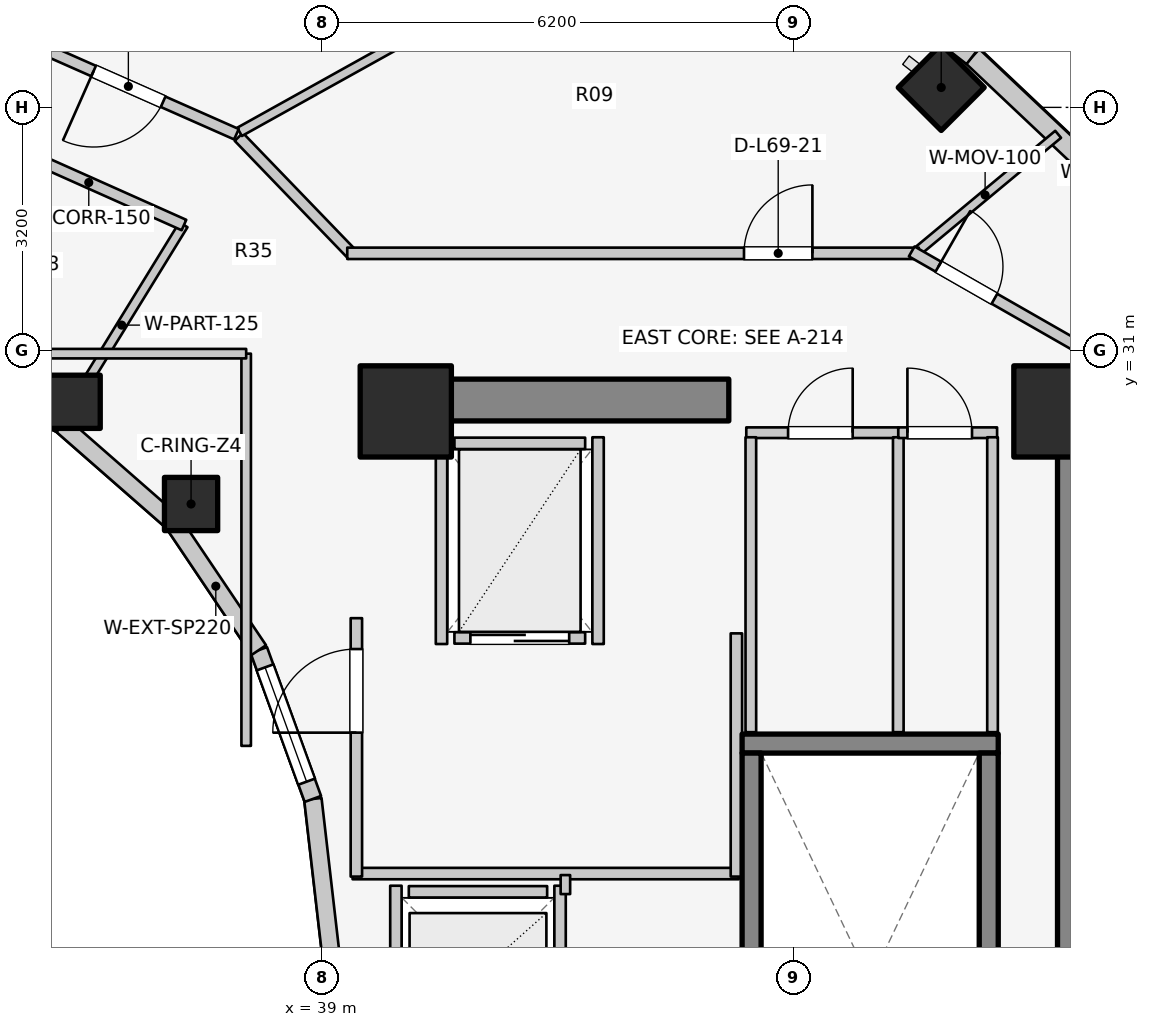
"""IFC4 building model, lengths in metres.
Left out: names, types, materials, properties, quantities, classifications, styles, units other than length and angle.
Written with IfcOpenShell. Run it as: python <this file> out.ifc"""

import sys

from ifc_helpers import new_model, si_unit, direction, frame, frame_2d, origin, origin_2d, place, context, subcontext, project, spatial, rectangle, extrude, element, fill, save


model = new_model("IFC4")
c1 = context("Model", 3, precision=1e-05, world=origin(), true_north=direction((0.0, 1.0)))
c2 = subcontext(c1, "Body", "Model", "MODEL_VIEW")
j1 = project(units=[si_unit("LENGTHUNIT", "METRE"), si_unit("PLANEANGLEUNIT", "RADIAN")], contexts=[c1])
p1 = place(None, origin())
s1 = spatial("IfcSite", under=j1, at=p1, CompositionType="ELEMENT")
p2 = place(p1, origin())
s2 = spatial("IfcBuilding", under=s1, at=p2, CompositionType="ELEMENT")
p3 = place(p2, frame((0.0, 0.0, 226.4)))
s3 = spatial("IfcBuildingStorey", under=s2, at=p3, CompositionType="ELEMENT", Elevation=226.4)
p4 = place(p3, frame((48.95, 17.05, 0.0), z_axis=(0.0, 0.0, 1.0), x_axis=(0.0, 1.0, 0.0)))
e1 = element("IfcWall", 1, at=p4, inside=s3, PredefinedType="SHEAR", context=c2, shape_type="SweptSolid", body=[
    extrude(rectangle(XDim=12.8, YDim=0.55, at=frame_2d((6.4, 0.0))), origin(), (0.0, 0.0, 1.0), 3.1),
])
p5 = place(p3, frame((39.85, 30.35, 0.0), z_axis=(0.0, 0.0, 1.0), x_axis=(1.0, 0.0, 0.0)))
e2 = element("IfcWall", 2, at=p5, inside=s3, PredefinedType="SHEAR", context=c2, shape_type="SweptSolid", body=[
    extrude(rectangle(XDim=4.5, YDim=0.55, at=frame_2d((2.25, 0.0))), origin(), (0.0, 0.0, 1.0), 3.1),
])
p6 = place(p3, frame((44.525, 25.83, 0.0), z_axis=(0.0, 0.0, 1.0), x_axis=(1.0, 0.0, 0.0)))
e3 = element("IfcWall", 3, at=p6, inside=s3, PredefinedType="SOLIDWALL", context=c2, shape_type="SweptSolid", body=[
    extrude(rectangle(XDim=3.37, YDim=0.25, at=frame_2d((1.685, 0.0))), origin(), (0.0, 0.0, 1.0), 3.1),
])
for number, where, z_axis, x_axis in (
    (4, (44.65, 17.895, 0.0), (0.0, 0.0, 1.0), (0.0, 1.0, 0.0)),
    (5, (47.77, 17.895, 0.0), (0.0, 0.0, 1.0), (0.0, 1.0, 0.0)),
):
    element("IfcWall", number, at=place(p3, frame(where, z_axis=z_axis, x_axis=x_axis)), inside=s3, PredefinedType="SOLIDWALL", context=c2, shape_type="SweptSolid", body=[
        extrude(rectangle(XDim=7.81, YDim=0.25, at=frame_2d((3.905, 0.0))), origin(), (0.0, 0.0, 1.0), 3.1),
    ])
for number, where, z_axis, x_axis in (
    (6, (48.7, 30.2, 0.0), (0.0, 0.0, 1.0), (1.0, 0.0, 0.0)),
    (7, (40.1, 30.2, 0.0), (0.0, 0.0, 1.0), (1.0, 0.0, 0.0)),
):
    element("IfcColumn", number, at=place(p3, frame(where, z_axis=z_axis, x_axis=x_axis)), inside=s3, PredefinedType="COLUMN", context=c2, shape_type="SweptSolid", body=[
        extrude(rectangle(XDim=1.2, YDim=1.2, at=origin_2d()), origin(), (0.0, 0.0, 1.0), 3.1),
    ])
p7 = place(p3, frame((37.275, 28.982, 0.0), z_axis=(0.0, 0.0, 1.0), x_axis=(1.0, 0.0, 0.0)))
e8 = element("IfcColumn", 8, at=p7, inside=s3, PredefinedType="COLUMN", context=c2, shape_type="SweptSolid", body=[
    extrude(rectangle(XDim=0.7, YDim=0.7, at=origin_2d()), origin(), (0.0, 0.0, 1.0), 3.1),
])
p8 = place(p3, frame((47.145, 34.462, 0.0), z_axis=(0.0, 0.0, 1.0), x_axis=(0.707106781187, 0.707106781187, 0.0)))
e9 = element("IfcColumn", 9, at=p8, inside=s3, PredefinedType="COLUMN", context=c2, shape_type="SweptSolid", body=[
    extrude(rectangle(XDim=0.8, YDim=0.8, at=origin_2d()), origin(), (0.0, 0.0, 1.0), 3.1),
])
p9 = place(p3, frame((35.73, 30.327, 0.0), z_axis=(0.0, 0.0, 1.0), x_axis=(1.0, 0.0, 0.0)))
e10 = element("IfcColumn", 10, at=p9, inside=s3, PredefinedType="COLUMN", context=c2, shape_type="SweptSolid", body=[
    extrude(rectangle(XDim=0.7, YDim=0.7, at=origin_2d()), origin(), (0.0, 0.0, 1.0), 3.1),
])
p10 = place(p3, frame((39.12, 23.0, 0.0), z_axis=(0.0, 0.0, 1.0), x_axis=(-0.114711713601, 0.993398823617, 0.0)))
e11 = element("IfcWall", 11, at=p10, inside=s3, PredefinedType="STANDARD", context=c2, shape_type="SweptSolid", body=[
    extrude(rectangle(XDim=2.115, YDim=0.23, at=frame_2d((1.058, 0.0))), origin(), (0.0, 0.0, 1.0), 2.84),
])
p11 = place(p3, frame((38.877, 25.102, 0.0), z_axis=(0.0, 0.0, 1.0), x_axis=(-0.341423187295, 0.93990968033, 0.0)))
e12 = element("IfcWall", 12, at=p11, inside=s3, PredefinedType="STANDARD", context=c2, shape_type="SweptSolid", body=[
    extrude(rectangle(XDim=2.084, YDim=0.23, at=frame_2d((1.042, 0.0))), origin(), (0.0, 0.0, 1.0), 2.84),
])
p12 = place(p11, frame((0.242, 0.0, 0.85)))
e13 = element("IfcOpeningElement", 13, at=p12, cuts=e12, PredefinedType="OPENING", context=c2, shape_type="SweptSolid", body=[
    extrude(rectangle(XDim=1.6, YDim=1.65, at=frame_2d((0.8, 0.825))), frame((0.0, 0.125, 0.0), z_axis=(0.0, -1.0, 0.0), x_axis=(1.0, 0.0, 0.0)), (0.0, 0.0, 1.0), 0.25),
])
p13 = place(p3, frame((38.166, 27.06, 0.0), z_axis=(0.0, 0.0, 1.0), x_axis=(-0.558197800898, 0.829707909492, 0.0)))
e14 = element("IfcWall", 14, at=p13, inside=s3, PredefinedType="STANDARD", context=c2, shape_type="SweptSolid", body=[
    extrude(rectangle(XDim=2.027, YDim=0.23, at=frame_2d((1.013, 0.0))), origin(), (0.0, 0.0, 1.0), 2.16),
])
p14 = place(p3, frame((37.035, 28.742, 0.0), z_axis=(0.0, 0.0, 1.0), x_axis=(-0.752576694707, 0.658504607869, 0.0)))
e15 = element("IfcWall", 15, at=p14, inside=s3, PredefinedType="STANDARD", context=c2, shape_type="SweptSolid", body=[
    extrude(rectangle(XDim=1.959, YDim=0.23, at=frame_2d((0.98, 0.0))), origin(), (0.0, 0.0, 1.0), 2.16),
])
p15 = place(p3, frame((35.56, 30.032, 0.0), z_axis=(0.0, 0.0, 1.0), x_axis=(-0.904179699603, 0.427152280606, 0.0)))
e16 = element("IfcWall", 16, at=p15, inside=s3, PredefinedType="STANDARD", context=c2, shape_type="SweptSolid", body=[
    extrude(rectangle(XDim=1.899, YDim=0.23, at=frame_2d((0.95, 0.0))), origin(), (0.0, 0.0, 1.0), 2.16),
])
p16 = place(p3, frame((50.761, 31.849, 0.0), z_axis=(0.0, 0.0, 1.0), x_axis=(-0.72731899451, 0.686299555752, 0.0)))
e17 = element("IfcWall", 17, at=p16, inside=s3, PredefinedType="STANDARD", context=c2, shape_type="SweptSolid", body=[
    extrude(rectangle(XDim=4.404, YDim=0.26, at=frame_2d((2.202, 0.0))), origin(), (0.0, 0.0, 1.0), 2.85),
])
p17 = place(p16, frame((0.867, 0.0, 0.75)))
e18 = element("IfcOpeningElement", 18, at=p17, cuts=e17, PredefinedType="OPENING", context=c2, shape_type="SweptSolid", body=[
    extrude(rectangle(XDim=1.2, YDim=1.5, at=frame_2d((0.6, 0.75))), frame((0.0, 0.14, 0.0), z_axis=(0.0, -1.0, 0.0), x_axis=(1.0, 0.0, 0.0)), (0.0, 0.0, 1.0), 0.28),
])
p18 = place(p3, frame((47.558, 34.872, 0.0), z_axis=(0.0, 0.0, 1.0), x_axis=(-0.790126214723, 0.612944177563, 0.0)))
e19 = element("IfcWall", 19, at=p18, inside=s3, PredefinedType="STANDARD", context=c2, shape_type="SweptSolid", body=[
    extrude(rectangle(XDim=4.667, YDim=0.26, at=frame_2d((2.333, 0.0))), origin(), (0.0, 0.0, 1.0), 2.85),
])
p19 = place(p3, frame((40.14, 23.88, 0.0), z_axis=(0.0, 0.0, 1.0), x_axis=(1.0, 0.0, 0.0)))
e20 = element("IfcWall", 20, at=p19, inside=s3, PredefinedType="SOLIDWALL", context=c2, shape_type="SweptSolid", body=[
    extrude(rectangle(XDim=1.82, YDim=0.15, at=frame_2d((0.91, 0.0))), origin(), (0.0, 0.0, 1.0), 2.12),
])
p20 = place(p3, frame((39.97, 21.64, 0.0), z_axis=(0.0, 0.0, 1.0), x_axis=(0.0, 1.0, 0.0)))
e21 = element("IfcWall", 21, at=p20, inside=s3, PredefinedType="SOLIDWALL", context=c2, shape_type="SweptSolid", body=[
    extrude(rectangle(XDim=2.32, YDim=0.15, at=frame_2d((1.16, 0.0))), origin(), (0.0, 0.0, 1.0), 2.12),
])
p21 = place(p3, frame((42.13, 21.64, 0.0), z_axis=(0.0, 0.0, 1.0), x_axis=(0.0, 1.0, 0.0)))
e22 = element("IfcWall", 22, at=p21, inside=s3, PredefinedType="SOLIDWALL", context=c2, shape_type="SweptSolid", body=[
    extrude(rectangle(XDim=2.32, YDim=0.15, at=frame_2d((1.16, 0.0))), origin(), (0.0, 0.0, 1.0), 2.855),
])
p22 = place(p3, frame((40.74, 27.22, 0.0), z_axis=(0.0, 0.0, 1.0), x_axis=(1.0, 0.0, 0.0)))
e23 = element("IfcWall", 23, at=p22, inside=s3, PredefinedType="SOLIDWALL", context=c2, shape_type="SweptSolid", body=[
    extrude(rectangle(XDim=1.72, YDim=0.15, at=frame_2d((0.86, 0.0))), origin(), (0.0, 0.0, 1.0), 2.855),
])
p23 = place(p22, frame((0.21, 0.0, 0.0)))
e24 = element("IfcOpeningElement", 24, at=p23, cuts=e23, PredefinedType="OPENING", context=c2, shape_type="SweptSolid", body=[
    extrude(rectangle(XDim=1.3, YDim=2.1, at=frame_2d((0.65, 1.05))), frame((0.0, 0.085, 0.0), z_axis=(0.0, -1.0, 0.0), x_axis=(1.0, 0.0, 0.0)), (0.0, 0.0, 1.0), 0.17),
])
p24 = place(p3, frame((40.74, 29.78, 0.0), z_axis=(0.0, 0.0, 1.0), x_axis=(1.0, 0.0, 0.0)))
e25 = element("IfcWall", 25, at=p24, inside=s3, PredefinedType="SOLIDWALL", context=c2, shape_type="SweptSolid", body=[
    extrude(rectangle(XDim=1.72, YDim=0.15, at=frame_2d((0.86, 0.0))), origin(), (0.0, 0.0, 1.0), 2.855),
])
for number, where, z_axis, x_axis in (
    (26, (40.57, 27.14, 0.0), (0.0, 0.0, 1.0), (0.0, 1.0, 0.0)),
    (27, (42.63, 27.14, 0.0), (0.0, 0.0, 1.0), (0.0, 1.0, 0.0)),
):
    element("IfcWall", number, at=place(p3, frame(where, z_axis=z_axis, x_axis=x_axis)), inside=s3, PredefinedType="SOLIDWALL", context=c2, shape_type="SweptSolid", body=[
        extrude(rectangle(XDim=2.72, YDim=0.15, at=frame_2d((1.36, 0.0))), origin(), (0.0, 0.0, 1.0), 2.855),
    ])
p25 = place(p3, frame((39.4, 24.12, 0.0), z_axis=(0.0, 0.0, 1.0), x_axis=(1.0, 0.0, 0.0)))
e28 = element("IfcWall", 28, at=p25, inside=s3, PredefinedType="PARTITIONING", context=c2, shape_type="SweptSolid", body=[
    extrude(rectangle(XDim=5.08, YDim=0.15, at=frame_2d((2.54, 0.0))), origin(), (0.0, 0.0, 1.0), 2.12),
])
p26 = place(p3, frame((44.45, 24.08, 0.0), z_axis=(0.0, 0.0, 1.0), x_axis=(0.0, 1.0, 0.0)))
e29 = element("IfcWall", 29, at=p26, inside=s3, PredefinedType="PARTITIONING", context=c2, shape_type="SweptSolid", body=[
    extrude(rectangle(XDim=3.2, YDim=0.15, at=frame_2d((1.6, 0.0))), origin(), (0.0, 0.0, 1.0), 2.855),
])
p27 = place(p3, frame((39.45, 24.08, 0.0), z_axis=(0.0, 0.0, 1.0), x_axis=(0.0, 1.0, 0.0)))
e30 = element("IfcWall", 30, at=p27, inside=s3, PredefinedType="PARTITIONING", context=c2, shape_type="SweptSolid", body=[
    extrude(rectangle(XDim=3.4, YDim=0.15, at=frame_2d((1.7, 0.0))), origin(), (0.0, 0.0, 1.0), 2.855),
])
p28 = place(p27, frame((1.894, 0.0, 0.0)))
e31 = element("IfcOpeningElement", 31, at=p28, cuts=e30, PredefinedType="OPENING", context=c2, shape_type="SweptSolid", body=[
    extrude(rectangle(XDim=1.1, YDim=2.1, at=frame_2d((0.55, 1.05))), frame((0.0, 0.085, 0.0), z_axis=(0.0, -1.0, 0.0), x_axis=(1.0, 0.0, 0.0)), (0.0, 0.0, 1.0), 0.17),
])
p29 = place(p3, frame((42.2, 23.85, 0.0), z_axis=(0.0, 0.0, 1.0), x_axis=(0.0, 1.0, 0.0)))
e32 = element("IfcWall", 32, at=p29, inside=s3, PredefinedType="PARTITIONING", context=c2, shape_type="SweptSolid", body=[
    extrude(rectangle(XDim=0.25, YDim=0.125, at=frame_2d((0.125, 0.0))), origin(), (0.0, 0.0, 1.0), 2.855),
])
p30 = place(p3, frame((44.58, 29.92, 0.0), z_axis=(0.0, 0.0, 1.0), x_axis=(1.0, 0.0, 0.0)))
e33 = element("IfcWall", 33, at=p30, inside=s3, PredefinedType="PLUMBINGWALL", context=c2, shape_type="SweptSolid", body=[
    extrude(rectangle(XDim=2.0, YDim=0.14, at=frame_2d((1.0, 0.0))), origin(), (0.0, 0.0, 1.0), 2.855),
])
p31 = place(p30, frame((0.55, 0.0, 0.0)))
e34 = element("IfcOpeningElement", 34, at=p31, cuts=e33, PredefinedType="OPENING", context=c2, shape_type="SweptSolid", body=[
    extrude(rectangle(XDim=0.85, YDim=2.05, at=frame_2d((0.425, 1.025))), frame((0.0, 0.08, 0.0), z_axis=(0.0, -1.0, 0.0), x_axis=(1.0, 0.0, 0.0)), (0.0, 0.0, 1.0), 0.16),
])
for number, where, z_axis, x_axis in (
    (35, (44.64, 25.98, 0.0), (0.0, 0.0, 1.0), (0.0, 1.0, 0.0)),
    (36, (46.58, 25.98, 0.0), (0.0, 0.0, 1.0), (0.0, 1.0, 0.0)),
):
    element("IfcWall", number, at=place(p3, frame(where, z_axis=z_axis, x_axis=x_axis)), inside=s3, PredefinedType="PLUMBINGWALL", context=c2, shape_type="SweptSolid", body=[
        extrude(rectangle(XDim=3.88, YDim=0.14, at=frame_2d((1.94, 0.0))), origin(), (0.0, 0.0, 1.0), 2.855),
    ])
p32 = place(p3, frame((46.58, 29.92, 0.0), z_axis=(0.0, 0.0, 1.0), x_axis=(1.0, 0.0, 0.0)))
e37 = element("IfcWall", 37, at=p32, inside=s3, PredefinedType="PLUMBINGWALL", context=c2, shape_type="SweptSolid", body=[
    extrude(rectangle(XDim=1.3, YDim=0.14, at=frame_2d((0.65, 0.0))), origin(), (0.0, 0.0, 1.0), 2.855),
])
p33 = place(p32, frame((0.12, 0.0, 0.0)))
e38 = element("IfcOpeningElement", 38, at=p33, cuts=e37, PredefinedType="OPENING", context=c2, shape_type="SweptSolid", body=[
    extrude(rectangle(XDim=0.85, YDim=2.05, at=frame_2d((0.425, 1.025))), frame((0.0, 0.08, 0.0), z_axis=(0.0, -1.0, 0.0), x_axis=(1.0, 0.0, 0.0)), (0.0, 0.0, 1.0), 0.16),
])
p34 = place(p3, frame((47.82, 25.98, 0.0), z_axis=(0.0, 0.0, 1.0), x_axis=(0.0, 1.0, 0.0)))
e39 = element("IfcWall", 39, at=p34, inside=s3, PredefinedType="PLUMBINGWALL", context=c2, shape_type="SweptSolid", body=[
    extrude(rectangle(XDim=3.88, YDim=0.14, at=frame_2d((1.94, 0.0))), origin(), (0.0, 0.0, 1.0), 2.855),
])
p35 = place(p3, frame((35.55, 30.015, 0.0), z_axis=(0.0, 0.0, 1.0), x_axis=(0.523992004803, 0.851723182086, 0.0)))
e40 = element("IfcWall", 40, at=p35, inside=s3, PredefinedType="PARTITIONING", context=c2, shape_type="SweptSolid", body=[
    extrude(rectangle(XDim=3.101, YDim=0.125, at=frame_2d((1.551, 0.0))), origin(), (0.0, 0.0, 1.0), 2.376),
])
p36 = place(p3, frame((37.181, 32.652, 0.0), z_axis=(0.0, 0.0, 1.0), x_axis=(-0.913120130558, 0.407690602257, 0.0)))
e41 = element("IfcWall", 41, at=p36, inside=s3, PredefinedType="PARTITIONING", context=c2, shape_type="SweptSolid", body=[
    extrude(rectangle(XDim=2.743, YDim=0.15, at=frame_2d((1.371, 0.0))), origin(), (0.0, 0.0, 1.0), 2.376),
])
p37 = place(p3, frame((38.0, 25.8, 0.0), z_axis=(0.0, 0.0, 1.0), x_axis=(0.0, 1.0, 0.0)))
e42 = element("IfcWall", 42, at=p37, inside=s3, PredefinedType="PARTITIONING", context=c2, shape_type="SweptSolid", body=[
    extrude(rectangle(XDim=5.16, YDim=0.125, at=frame_2d((2.58, 0.0))), origin(), (0.0, 0.0, 1.0), 2.232),
])
p38 = place(p3, frame((35.4, 30.96, 0.0), z_axis=(0.0, 0.0, 1.0), x_axis=(1.0, 0.0, 0.0)))
e43 = element("IfcWall", 43, at=p38, inside=s3, PredefinedType="PARTITIONING", context=c2, shape_type="SweptSolid", body=[
    extrude(rectangle(XDim=2.6, YDim=0.125, at=frame_2d((1.3, 0.0))), origin(), (0.0, 0.0, 1.0), 2.376),
])
p39 = place(p3, frame((46.762, 32.248, 0.0), z_axis=(0.0, 0.0, 1.0), x_axis=(0.76890954941, 0.639357571962, 0.0)))
e44 = element("IfcWall", 44, at=p39, inside=s3, PredefinedType="MOVABLE", context=c2, shape_type="SweptSolid", body=[
    extrude(rectangle(XDim=2.499, YDim=0.12, at=frame_2d((1.25, 0.0))), origin(), (0.0, 0.0, 1.0), 2.22),
])
p40 = place(p3, frame((37.903, 33.812, 0.0), z_axis=(0.0, 0.0, 1.0), x_axis=(0.694032962553, -0.719943224768, 0.0)))
e45 = element("IfcWall", 45, at=p40, inside=s3, PredefinedType="PARTITIONING", context=c2, shape_type="SweptSolid", body=[
    extrude(rectangle(XDim=2.158, YDim=0.15, at=frame_2d((1.079, 0.0))), origin(), (0.0, 0.0, 1.0), 2.376),
])
p41 = place(p3, frame((39.33, 32.28, 0.0), z_axis=(0.0, 0.0, 1.0), x_axis=(1.0, 0.0, 0.0)))
e46 = element("IfcWall", 46, at=p41, inside=s3, PredefinedType="PARTITIONING", context=c2, shape_type="SweptSolid", body=[
    extrude(rectangle(XDim=7.52, YDim=0.15, at=frame_2d((3.76, 0.0))), origin(), (0.0, 0.0, 1.0), 2.376),
])
p42 = place(p41, frame((5.22, 0.0, 0.0)))
e47 = element("IfcOpeningElement", 47, at=p42, cuts=e46, PredefinedType="OPENING", context=c2, shape_type="SweptSolid", body=[
    extrude(rectangle(XDim=0.9, YDim=2.1, at=frame_2d((0.45, 1.05))), frame((0.0, 0.085, 0.0), z_axis=(0.0, -1.0, 0.0), x_axis=(1.0, 0.0, 0.0)), (0.0, 0.0, 1.0), 0.17),
])
p43 = place(p3, frame((46.757, 32.305, 0.0), z_axis=(0.0, 0.0, 1.0), x_axis=(0.867991349648, -0.496579315857, 0.0)))
e48 = element("IfcWall", 48, at=p43, inside=s3, PredefinedType="PARTITIONING", context=c2, shape_type="SweptSolid", body=[
    extrude(rectangle(XDim=2.567, YDim=0.15, at=frame_2d((1.283, 0.0))), origin(), (0.0, 0.0, 1.0), 2.22),
])
p44 = place(p43, frame((0.404, 0.0, 0.0)))
e49 = element("IfcOpeningElement", 49, at=p44, cuts=e48, PredefinedType="OPENING", context=c2, shape_type="SweptSolid", body=[
    extrude(rectangle(XDim=0.85, YDim=2.05, at=frame_2d((0.425, 1.025))), frame((0.0, 0.085, 0.0), z_axis=(0.0, -1.0, 0.0), x_axis=(1.0, 0.0, 0.0)), (0.0, 0.0, 1.0), 0.17),
])
p45 = place(p3, frame((37.913, 33.878, 0.0), z_axis=(0.0, 0.0, 1.0), x_axis=(0.87377679808, 0.486327160599, 0.0)))
e50 = element("IfcWall", 50, at=p45, inside=s3, PredefinedType="PARTITIONING", context=c2, shape_type="SweptSolid", body=[
    extrude(rectangle(XDim=6.24, YDim=0.125, at=frame_2d((3.12, 0.0))), origin(), (0.0, 0.0, 1.0), 2.376),
])
p46 = place(p3, frame((37.872, 33.847, 0.0), z_axis=(0.0, 0.0, 1.0), x_axis=(-0.914490094652, 0.40460828808, 0.0)))
e51 = element("IfcWall", 51, at=p46, inside=s3, PredefinedType="PARTITIONING", context=c2, shape_type="SweptSolid", body=[
    extrude(rectangle(XDim=3.11, YDim=0.15, at=frame_2d((1.555, 0.0))), origin(), (0.0, 0.0, 1.0), 2.376),
])
p47 = place(p46, frame((1.055, 0.0, 0.0)))
e52 = element("IfcOpeningElement", 52, at=p47, cuts=e51, PredefinedType="OPENING", context=c2, shape_type="SweptSolid", body=[
    extrude(rectangle(XDim=1.0, YDim=2.1, at=frame_2d((0.5, 1.05))), frame((0.0, 0.085, 0.0), z_axis=(0.0, -1.0, 0.0), x_axis=(1.0, 0.0, 0.0)), (0.0, 0.0, 1.0), 0.17),
])
p48 = place(p12, origin())
e53 = element("IfcWindow", 53, at=p48, inside=s3, PartitioningType="SINGLE_PANEL", PredefinedType="WINDOW", context=c2, shape_type="SweptSolid", body=[
    extrude(rectangle(XDim=1.6, YDim=1.65, at=frame_2d((0.8, 0.825))), frame((0.0, 0.03, 0.0), z_axis=(0.0, -1.0, 0.0), x_axis=(1.0, 0.0, 0.0)), (0.0, 0.0, 1.0), 0.06),
])
fill(e13, e53)
p49 = place(p23, origin())
e54 = element("IfcDoor", 54, at=p49, inside=s3, OperationType="DOUBLE_DOOR_SLIDING", PredefinedType="DOOR", context=c2, shape_type="SweptSolid", body=[
    extrude(rectangle(XDim=1.3, YDim=2.1, at=frame_2d((0.65, 1.05))), frame((0.0, 0.025, 0.0), z_axis=(0.0, -1.0, 0.0), x_axis=(1.0, 0.0, 0.0)), (0.0, 0.0, 1.0), 0.05),
])
fill(e24, e54)
p50 = place(p28, origin())
e55 = element("IfcDoor", 55, at=p50, inside=s3, OperationType="SINGLE_SWING_LEFT", PredefinedType="DOOR", context=c2, shape_type="SweptSolid", body=[
    extrude(rectangle(XDim=1.1, YDim=2.1, at=frame_2d((0.55, 1.05))), frame((0.0, 0.025, 0.0), z_axis=(0.0, -1.0, 0.0), x_axis=(1.0, 0.0, 0.0)), (0.0, 0.0, 1.0), 0.05),
])
fill(e31, e55)
p51 = place(p31, origin())
e56 = element("IfcDoor", 56, at=p51, inside=s3, OperationType="SINGLE_SWING_RIGHT", PredefinedType="DOOR", context=c2, shape_type="SweptSolid", body=[
    extrude(rectangle(XDim=0.85, YDim=2.05, at=frame_2d((0.425, 1.025))), frame((0.0, 0.025, 0.0), z_axis=(0.0, -1.0, 0.0), x_axis=(1.0, 0.0, 0.0)), (0.0, 0.0, 1.0), 0.05),
])
fill(e34, e56)
p52 = place(p33, origin())
e57 = element("IfcDoor", 57, at=p52, inside=s3, OperationType="SINGLE_SWING_LEFT", PredefinedType="DOOR", context=c2, shape_type="SweptSolid", body=[
    extrude(rectangle(XDim=0.85, YDim=2.05, at=frame_2d((0.425, 1.025))), frame((0.0, 0.025, 0.0), z_axis=(0.0, -1.0, 0.0), x_axis=(1.0, 0.0, 0.0)), (0.0, 0.0, 1.0), 0.05),
])
fill(e38, e57)
p53 = place(p42, origin())
e58 = element("IfcDoor", 58, at=p53, inside=s3, OperationType="SINGLE_SWING_RIGHT", PredefinedType="DOOR", context=c2, shape_type="SweptSolid", body=[
    extrude(rectangle(XDim=0.9, YDim=2.1, at=frame_2d((0.45, 1.05))), frame((0.0, 0.025, 0.0), z_axis=(0.0, -1.0, 0.0), x_axis=(1.0, 0.0, 0.0)), (0.0, 0.0, 1.0), 0.05),
])
fill(e47, e58)
p54 = place(p44, origin())
e59 = element("IfcDoor", 59, at=p54, inside=s3, OperationType="SINGLE_SWING_LEFT", PredefinedType="DOOR", context=c2, shape_type="SweptSolid", body=[
    extrude(rectangle(XDim=0.85, YDim=2.05, at=frame_2d((0.425, 1.025))), frame((0.0, 0.025, 0.0), z_axis=(0.0, -1.0, 0.0), x_axis=(1.0, 0.0, 0.0)), (0.0, 0.0, 1.0), 0.05),
])
fill(e49, e59)
p55 = place(p47, origin())
e60 = element("IfcDoor", 60, at=p55, inside=s3, OperationType="SINGLE_SWING_RIGHT", PredefinedType="DOOR", context=c2, shape_type="SweptSolid", body=[
    extrude(rectangle(XDim=1.0, YDim=2.1, at=frame_2d((0.5, 1.05))), frame((0.0, 0.025, 0.0), z_axis=(0.0, -1.0, 0.0), x_axis=(1.0, 0.0, 0.0)), (0.0, 0.0, 1.0), 0.05),
])
fill(e52, e60)
save(model, sys.argv[1])
